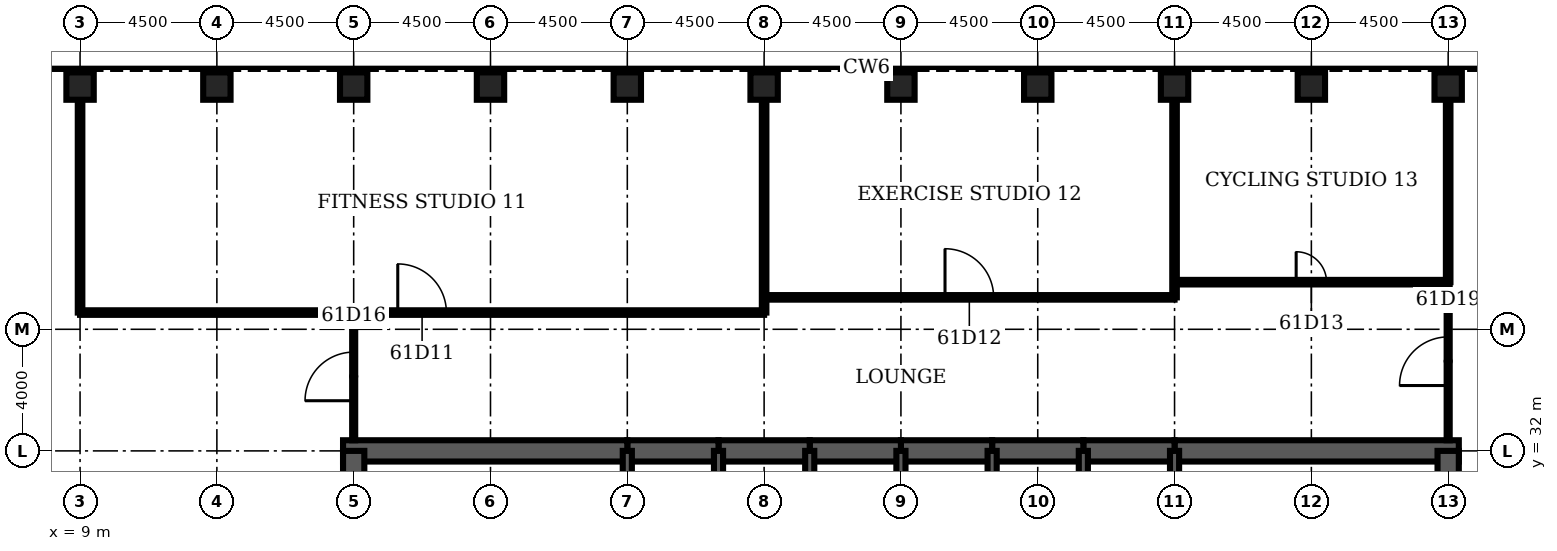
"""IFC4 building model, lengths in metres.
Left out: names, types, materials, properties, quantities, classifications, styles, units other than length and angle.
Written with IfcOpenShell. Run it as: python <this file> out.ifc"""

import sys

from ifc_helpers import new_model, si_unit, direction, frame, frame_2d, origin, origin_2d, place, context, subcontext, project, spatial, rectangle, hollow_rectangle, extrude, element, fill, save


model = new_model("IFC4")
c1 = context("Model", 3, precision=1e-05, world=origin(), true_north=direction((0.0, 1.0)))
c2 = subcontext(c1, "Body", "Model", "MODEL_VIEW")
j1 = project(units=[si_unit("LENGTHUNIT", "METRE"), si_unit("PLANEANGLEUNIT", "RADIAN")], contexts=[c1])
p1 = place(None, origin())
s1 = spatial("IfcSite", under=j1, at=p1, CompositionType="ELEMENT")
p2 = place(p1, origin())
s2 = spatial("IfcBuilding", under=s1, at=p2, CompositionType="ELEMENT")
p3 = place(p2, frame((0.0, 0.0, 271.1)))
s3 = spatial("IfcBuildingStorey", under=s2, at=p3, CompositionType="ELEMENT", Elevation=271.1)
for number, where, z_axis, x_axis in (
    (1, (54.0, 44.0, 0.0), (0.0, 0.0, 1.0), (0.0, 1.0, 0.0)),
    (2, (49.5, 44.0, 0.0), (0.0, 0.0, 1.0), (0.0, 1.0, 0.0)),
    (3, (45.0, 44.0, 0.0), (0.0, 0.0, 1.0), (0.0, 1.0, 0.0)),
    (4, (40.5, 44.0, 0.0), (0.0, 0.0, 1.0), (0.0, 1.0, 0.0)),
    (5, (36.0, 44.0, 0.0), (0.0, 0.0, 1.0), (0.0, 1.0, 0.0)),
    (6, (31.5, 44.0, 0.0), (0.0, 0.0, 1.0), (0.0, 1.0, 0.0)),
    (7, (27.0, 44.0, 0.0), (0.0, 0.0, 1.0), (0.0, 1.0, 0.0)),
    (8, (22.5, 44.0, 0.0), (0.0, 0.0, 1.0), (0.0, 1.0, 0.0)),
    (9, (18.0, 44.0, 0.0), (0.0, 0.0, 1.0), (0.0, 1.0, 0.0)),
    (10, (13.5, 44.0, 0.0), (0.0, 0.0, 1.0), (0.0, 1.0, 0.0)),
    (11, (9.0, 44.0, 0.0), (0.0, 0.0, 1.0), (0.0, 1.0, 0.0)),
):
    element("IfcColumn", number, at=place(p3, frame(where, z_axis=z_axis, x_axis=x_axis)), inside=s3, PredefinedType="COLUMN", context=c2, shape_type="SweptSolid", body=[
        extrude(hollow_rectangle(XDim=0.9, YDim=0.9, WallThickness=0.07, at=origin_2d()), origin(), (0.0, 0.0, 1.0), 4.2),
    ])
p4 = place(p3, frame((54.35, 32.0, 0.0), z_axis=(0.0, 0.0, 1.0), x_axis=(-1.0, 0.0, 0.0)))
e12 = element("IfcWall", 12, at=p4, inside=s3, PredefinedType="SHEAR", context=c2, shape_type="SweptSolid", body=[
    extrude(rectangle(XDim=9.35, YDim=0.7, at=frame_2d((4.675, 0.0))), origin(), (0.0, 0.0, 1.0), 4.2),
])
for number, where, z_axis, x_axis in (
    (13, (45.0, 32.0, 0.0), (0.0, 0.0, 1.0), (-1.0, 0.0, 0.0)),
    (14, (42.0, 32.0, 0.0), (0.0, 0.0, 1.0), (-1.0, 0.0, 0.0)),
    (15, (39.0, 32.0, 0.0), (0.0, 0.0, 1.0), (-1.0, 0.0, 0.0)),
    (16, (36.0, 32.0, 0.0), (0.0, 0.0, 1.0), (-1.0, 0.0, 0.0)),
    (17, (33.0, 32.0, 0.0), (0.0, 0.0, 1.0), (-1.0, 0.0, 0.0)),
    (18, (30.0, 32.0, 0.0), (0.0, 0.0, 1.0), (-1.0, 0.0, 0.0)),
):
    element("IfcWall", number, at=place(p3, frame(where, z_axis=z_axis, x_axis=x_axis)), inside=s3, PredefinedType="SHEAR", context=c2, shape_type="SweptSolid", body=[
        extrude(rectangle(XDim=3.0, YDim=0.7, at=frame_2d((1.5, 0.0))), origin(), (0.0, 0.0, 1.0), 4.2),
    ])
p5 = place(p3, frame((27.0, 32.0, 0.0), z_axis=(0.0, 0.0, 1.0), x_axis=(-1.0, 0.0, 0.0)))
e19 = element("IfcWall", 19, at=p5, inside=s3, PredefinedType="SHEAR", context=c2, shape_type="SweptSolid", body=[
    extrude(rectangle(XDim=9.35, YDim=0.7, at=frame_2d((4.675, 0.0))), origin(), (0.0, 0.0, 1.0), 4.2),
])
for number, where, z_axis, x_axis in (
    (20, (18.0, 32.0, 0.0), (0.0, 0.0, 1.0), (0.0, -1.0, 0.0)),
    (21, (54.0, 28.8, 0.0), (0.0, 0.0, 1.0), (0.0, 1.0, 0.0)),
):
    element("IfcWall", number, at=place(p3, frame(where, z_axis=z_axis, x_axis=x_axis)), inside=s3, PredefinedType="SHEAR", context=c2, shape_type="SweptSolid", body=[
        extrude(rectangle(XDim=3.2, YDim=0.7, at=frame_2d((1.6, 0.0))), origin(), (0.0, 0.0, 1.0), 4.2),
    ])
for number, where, z_axis, x_axis in (
    (22, (27.0, 28.8, 0.0), (0.0, 0.0, 1.0), (0.0, 1.0, 0.0)),
    (23, (30.0, 28.8, 0.0), (0.0, 0.0, 1.0), (0.0, 1.0, 0.0)),
    (24, (33.0, 28.8, 0.0), (0.0, 0.0, 1.0), (0.0, 1.0, 0.0)),
    (25, (36.0, 28.8, 0.0), (0.0, 0.0, 1.0), (0.0, 1.0, 0.0)),
    (26, (39.0, 28.8, 0.0), (0.0, 0.0, 1.0), (0.0, 1.0, 0.0)),
    (27, (42.0, 28.8, 0.0), (0.0, 0.0, 1.0), (0.0, 1.0, 0.0)),
    (28, (45.0, 28.8, 0.0), (0.0, 0.0, 1.0), (0.0, 1.0, 0.0)),
):
    element("IfcWall", number, at=place(p3, frame(where, z_axis=z_axis, x_axis=x_axis)), inside=s3, PredefinedType="SOLIDWALL", context=c2, shape_type="SweptSolid", body=[
        extrude(rectangle(XDim=3.2, YDim=0.3, at=frame_2d((1.6, 0.0))), origin(), (0.0, 0.0, 1.0), 4.2),
    ])
p6 = place(p3, frame((9.0, 36.55, 0.0), z_axis=(0.0, 0.0, 1.0), x_axis=(1.0, 0.0, 0.0)))
e29 = element("IfcWall", 29, at=p6, inside=s3, PredefinedType="PARTITIONING", context=c2, shape_type="SweptSolid", body=[
    extrude(rectangle(XDim=22.5, YDim=0.15, at=frame_2d((11.25, 0.0))), origin(), (0.0, 0.0, 1.0), 3.0),
])
p7 = place(p6, frame((10.45, 0.0, 0.0)))
e30 = element("IfcOpeningElement", 30, at=p7, cuts=e29, PredefinedType="OPENING", context=c2, shape_type="SweptSolid", body=[
    extrude(rectangle(XDim=1.6, YDim=2.1, at=frame_2d((0.8, 1.05))), frame((0.0, 0.085, 0.0), z_axis=(0.0, -1.0, 0.0), x_axis=(1.0, 0.0, 0.0)), (0.0, 0.0, 1.0), 0.17),
])
p8 = place(p3, frame((31.5, 37.05, 0.0), z_axis=(0.0, 0.0, 1.0), x_axis=(1.0, 0.0, 0.0)))
e31 = element("IfcWall", 31, at=p8, inside=s3, PredefinedType="PARTITIONING", context=c2, shape_type="SweptSolid", body=[
    extrude(rectangle(XDim=13.5, YDim=0.15, at=frame_2d((6.75, 0.0))), origin(), (0.0, 0.0, 1.0), 3.0),
])
p9 = place(p8, frame((5.95, 0.0, 0.0)))
e32 = element("IfcOpeningElement", 32, at=p9, cuts=e31, PredefinedType="OPENING", context=c2, shape_type="SweptSolid", body=[
    extrude(rectangle(XDim=1.6, YDim=2.1, at=frame_2d((0.8, 1.05))), frame((0.0, 0.085, 0.0), z_axis=(0.0, -1.0, 0.0), x_axis=(1.0, 0.0, 0.0)), (0.0, 0.0, 1.0), 0.17),
])
p10 = place(p3, frame((45.0, 37.55, 0.0), z_axis=(0.0, 0.0, 1.0), x_axis=(1.0, 0.0, 0.0)))
e33 = element("IfcWall", 33, at=p10, inside=s3, PredefinedType="PARTITIONING", context=c2, shape_type="SweptSolid", body=[
    extrude(rectangle(XDim=9.0, YDim=0.15, at=frame_2d((4.5, 0.0))), origin(), (0.0, 0.0, 1.0), 3.0),
])
p11 = place(p10, frame((4.0, 0.0, 0.0)))
e34 = element("IfcOpeningElement", 34, at=p11, cuts=e33, PredefinedType="OPENING", context=c2, shape_type="SweptSolid", body=[
    extrude(rectangle(XDim=1.0, YDim=2.1, at=frame_2d((0.5, 1.05))), frame((0.0, 0.085, 0.0), z_axis=(0.0, -1.0, 0.0), x_axis=(1.0, 0.0, 0.0)), (0.0, 0.0, 1.0), 0.17),
])
p12 = place(p3, frame((9.0, 36.55, 0.0), z_axis=(0.0, 0.0, 1.0), x_axis=(0.0, 1.0, 0.0)))
e35 = element("IfcWall", 35, at=p12, inside=s3, PredefinedType="PARTITIONING", context=c2, shape_type="SweptSolid", body=[
    extrude(rectangle(XDim=7.0, YDim=0.15, at=frame_2d((3.5, 0.0))), origin(), (0.0, 0.0, 1.0), 3.0),
])
p13 = place(p3, frame((18.0, 32.35, 0.0), z_axis=(0.0, 0.0, 1.0), x_axis=(0.0, 1.0, 0.0)))
e36 = element("IfcWall", 36, at=p13, inside=s3, PredefinedType="PARTITIONING", context=c2, shape_type="SweptSolid", body=[
    extrude(rectangle(XDim=4.2, YDim=0.1, at=frame_2d((2.1, 0.0))), origin(), (0.0, 0.0, 1.0), 3.0),
])
p14 = place(p13, frame((1.3, 0.0, 0.0)))
e37 = element("IfcOpeningElement", 37, at=p14, cuts=e36, PredefinedType="OPENING", context=c2, shape_type="SweptSolid", body=[
    extrude(rectangle(XDim=1.6, YDim=2.1, at=frame_2d((0.8, 1.05))), frame((0.0, 0.06, 0.0), z_axis=(0.0, -1.0, 0.0), x_axis=(1.0, 0.0, 0.0)), (0.0, 0.0, 1.0), 0.12),
])
p15 = place(p3, frame((31.5, 36.55, 0.0), z_axis=(0.0, 0.0, 1.0), x_axis=(0.0, 1.0, 0.0)))
e38 = element("IfcWall", 38, at=p15, inside=s3, PredefinedType="PARTITIONING", context=c2, shape_type="SweptSolid", body=[
    extrude(rectangle(XDim=7.0, YDim=0.15, at=frame_2d((3.5, 0.0))), origin(), (0.0, 0.0, 1.0), 3.0),
])
p16 = place(p3, frame((45.0, 37.05, 0.0), z_axis=(0.0, 0.0, 1.0), x_axis=(0.0, 1.0, 0.0)))
e39 = element("IfcWall", 39, at=p16, inside=s3, PredefinedType="PARTITIONING", context=c2, shape_type="SweptSolid", body=[
    extrude(rectangle(XDim=6.5, YDim=0.15, at=frame_2d((3.25, 0.0))), origin(), (0.0, 0.0, 1.0), 3.0),
])
p17 = place(p3, frame((54.0, 32.35, 0.0), z_axis=(0.0, 0.0, 1.0), x_axis=(0.0, 1.0, 0.0)))
e40 = element("IfcWall", 40, at=p17, inside=s3, PredefinedType="PARTITIONING", context=c2, shape_type="SweptSolid", body=[
    extrude(rectangle(XDim=5.2, YDim=0.1, at=frame_2d((2.6, 0.0))), origin(), (0.0, 0.0, 1.0), 3.0),
])
p18 = place(p17, frame((1.8, 0.0, 0.0)))
e41 = element("IfcOpeningElement", 41, at=p18, cuts=e40, PredefinedType="OPENING", context=c2, shape_type="SweptSolid", body=[
    extrude(rectangle(XDim=1.6, YDim=2.1, at=frame_2d((0.8, 1.05))), frame((0.0, 0.06, 0.0), z_axis=(0.0, -1.0, 0.0), x_axis=(1.0, 0.0, 0.0)), (0.0, 0.0, 1.0), 0.12),
])
p19 = place(p3, frame((54.0, 37.55, 0.0), z_axis=(0.0, 0.0, 1.0), x_axis=(0.0, 1.0, 0.0)))
e42 = element("IfcWall", 42, at=p19, inside=s3, PredefinedType="PARTITIONING", context=c2, shape_type="SweptSolid", body=[
    extrude(rectangle(XDim=6.0, YDim=0.15, at=frame_2d((3.0, 0.0))), origin(), (0.0, 0.0, 1.0), 3.0),
])
p20 = place(p7, origin())
e43 = element("IfcDoor", 43, at=p20, inside=s3, OperationType="SINGLE_SWING_LEFT", PredefinedType="DOOR", context=c2, shape_type="SweptSolid", body=[
    extrude(rectangle(XDim=1.6, YDim=2.1, at=frame_2d((0.8, 1.05))), frame((0.0, 0.025, 0.0), z_axis=(0.0, -1.0, 0.0), x_axis=(1.0, 0.0, 0.0)), (0.0, 0.0, 1.0), 0.05),
])
fill(e30, e43)
p21 = place(p9, origin())
e44 = element("IfcDoor", 44, at=p21, inside=s3, OperationType="SINGLE_SWING_LEFT", PredefinedType="DOOR", context=c2, shape_type="SweptSolid", body=[
    extrude(rectangle(XDim=1.6, YDim=2.1, at=frame_2d((0.8, 1.05))), frame((0.0, 0.025, 0.0), z_axis=(0.0, -1.0, 0.0), x_axis=(1.0, 0.0, 0.0)), (0.0, 0.0, 1.0), 0.05),
])
fill(e32, e44)
p22 = place(p11, origin())
e45 = element("IfcDoor", 45, at=p22, inside=s3, OperationType="SINGLE_SWING_LEFT", PredefinedType="DOOR", context=c2, shape_type="SweptSolid", body=[
    extrude(rectangle(XDim=1.0, YDim=2.1, at=frame_2d((0.5, 1.05))), frame((0.0, 0.025, 0.0), z_axis=(0.0, -1.0, 0.0), x_axis=(1.0, 0.0, 0.0)), (0.0, 0.0, 1.0), 0.05),
])
fill(e34, e45)
p23 = place(p14, origin())
e46 = element("IfcDoor", 46, at=p23, inside=s3, OperationType="SINGLE_SWING_LEFT", PredefinedType="DOOR", context=c2, shape_type="SweptSolid", body=[
    extrude(rectangle(XDim=1.6, YDim=2.1, at=frame_2d((0.8, 1.05))), frame((0.0, 0.025, 0.0), z_axis=(0.0, -1.0, 0.0), x_axis=(1.0, 0.0, 0.0)), (0.0, 0.0, 1.0), 0.05),
])
fill(e37, e46)
p24 = place(p18, origin())
e47 = element("IfcDoor", 47, at=p24, inside=s3, OperationType="SINGLE_SWING_LEFT", PredefinedType="DOOR", context=c2, shape_type="SweptSolid", body=[
    extrude(rectangle(XDim=1.6, YDim=2.1, at=frame_2d((0.8, 1.05))), frame((0.0, 0.025, 0.0), z_axis=(0.0, -1.0, 0.0), x_axis=(1.0, 0.0, 0.0)), (0.0, 0.0, 1.0), 0.05),
])
fill(e41, e47)
save(model, sys.argv[1])
